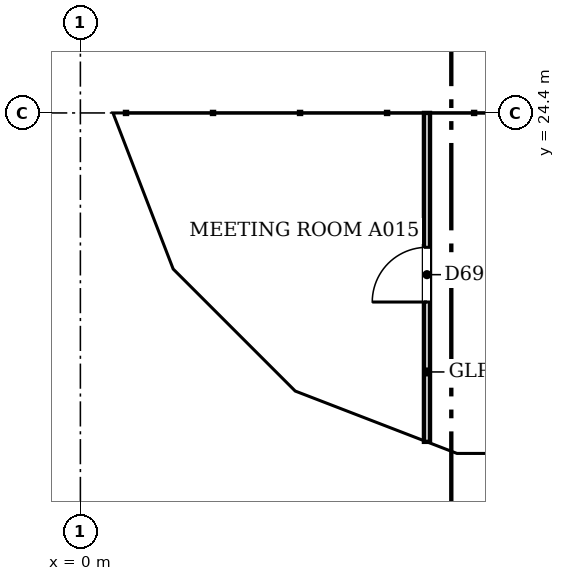
"""IFC4 building model, lengths in metres.
Left out: names, types, materials, properties, quantities, classifications, styles, units other than length and angle.
Written with IfcOpenShell. Run it as: python <this file> out.ifc"""

import sys

from ifc_helpers import new_model, si_unit, direction, frame, frame_2d, origin, place, context, subcontext, project, spatial, polyline, rectangle, outline, extrude, faceted_brep, source, transform, mapped, element, fill, save


model = new_model("IFC4")
c1 = context("Model", 3, precision=1e-05, world=origin(), true_north=direction((0.0, 1.0)))
c2 = subcontext(c1, "Body", "Model", "MODEL_VIEW")
j1 = project(units=[si_unit("LENGTHUNIT", "METRE"), si_unit("PLANEANGLEUNIT", "RADIAN")], contexts=[c1])
p1 = place(None, origin())
s1 = spatial("IfcSite", under=j1, at=p1, CompositionType="ELEMENT")
p2 = place(p1, origin())
s2 = spatial("IfcBuilding", under=s1, at=p2, CompositionType="ELEMENT")
p3 = place(p2, frame((0.0, 0.0, 209.3)))
s3 = spatial("IfcBuildingStorey", under=s2, at=p3, CompositionType="ELEMENT", Elevation=209.3)
m1 = source(origin(), c2, "Body", "Brep", [
    faceted_brep([(3.003, -0.25, 0.0), (3.05, -0.25, 0.06), (3.05, -0.25, 7.54), (3.003, -0.25, 7.6), (0.0, -0.25, 3.8), (0.0, 0.25, 3.8), (2.957, 0.25, 7.541), (2.957, 0.25, 0.059), (3.003, 0.0, 0.0), (3.003, 0.0, 7.6)], [[[0, 1, 2, 3, 4]], [[5, 6, 7]], [[1, 0, 8]], [[9, 3, 2]], [[6, 5, 4, 3, 9]], [[5, 7, 8, 0, 4]], [[1, 8, 7, 6, 9, 2]]]),
])
p4 = place(p3, frame((0.25, 27.45, -3.8), z_axis=(0.0, 0.0, 1.0), x_axis=(0.0, -1.0, 0.0)))
e1 = element("IfcWall", 1, at=p4, inside=s3, PredefinedType="SOLIDWALL", context=c2, shape_type="MappedRepresentation", body=[
    mapped(m1, transform((0.0, 0.0, 0.0), scale=1.0)),
])
m2 = source(origin(), c2, "Body", "SweptSolid", [
    extrude(outline(polyline([(2.803, 6.944), (0.319, 3.8), (2.803, 0.656), (2.803, 6.944)])), frame((0.0, 0.26, 0.0), z_axis=(0.0, -1.0, 0.0), x_axis=(1.0, 0.0, 0.0)), (0.0, 0.0, 1.0), 0.52),
])
p5 = place(p4, origin())
e2 = element("IfcOpeningElement", 2, at=p5, cuts=e1, PredefinedType="OPENING", context=c2, shape_type="MappedRepresentation", body=[
    mapped(m2, transform((0.0, 0.0, 0.0), scale=1.0)),
])
m3 = source(origin(), c2, "Body", "Brep", [
    faceted_brep([(0.047, -0.25, 0.0), (2.997, -0.25, 3.8), (0.047, -0.25, 7.6), (0.0, -0.25, 7.541), (0.0, -0.25, 0.059), (0.093, 0.25, 7.54), (2.944, 0.25, 3.868), (2.944, 0.25, 3.732), (0.093, 0.25, 0.06), (2.997, 0.0, 3.8), (0.047, 0.0, 0.0), (0.047, 0.0, 7.6)], [[[0, 1, 2, 3, 4]], [[5, 6, 7, 8]], [[8, 7, 9, 1, 0, 10]], [[6, 5, 11, 2, 1, 9]], [[3, 2, 11]], [[10, 0, 4]], [[8, 10, 4, 3, 11, 5]], [[9, 7, 6]]]),
])
p6 = place(p3, frame((0.233, 24.49, -3.8), z_axis=(0.0, 0.0, 1.0), x_axis=(0.359901446078, -0.932990326376, 0.0)))
e3 = element("IfcWall", 3, at=p6, inside=s3, PredefinedType="SOLIDWALL", context=c2, shape_type="MappedRepresentation", body=[
    mapped(m3, transform((0.0, 0.0, 0.0), scale=1.0)),
])
m4 = source(origin(), c2, "Body", "SweptSolid", [
    extrude(outline(polyline([(0.247, 0.665), (2.681, 3.8), (0.247, 6.935), (0.247, 0.665)])), frame((0.0, 0.26, 0.0), z_axis=(0.0, -1.0, 0.0), x_axis=(1.0, 0.0, 0.0)), (0.0, 0.0, 1.0), 0.52),
])
p7 = place(p6, origin())
e4 = element("IfcOpeningElement", 4, at=p7, cuts=e3, PredefinedType="OPENING", context=c2, shape_type="MappedRepresentation", body=[
    mapped(m4, transform((0.0, 0.0, 0.0), scale=1.0)),
])
m5 = source(origin(), c2, "Body", "Brep", [
    faceted_brep([(2.944, -0.25, 0.0), (2.997, -0.25, 0.068), (2.997, -0.25, 7.532), (2.944, -0.25, 7.6), (0.0, -0.25, 3.8), (0.053, 0.25, 3.868), (2.891, 0.25, 7.532), (2.891, 0.25, 0.068), (0.053, 0.25, 3.732), (2.944, 0.0, 0.0), (2.944, 0.0, 7.6), (0.0, 0.0, 3.8)], [[[0, 1, 2, 3, 4]], [[5, 6, 7, 8]], [[1, 0, 9]], [[10, 3, 2]], [[6, 5, 11, 4, 3, 10]], [[8, 7, 9, 0, 4, 11]], [[8, 11, 5]], [[1, 9, 7, 6, 10, 2]]]),
])
p8 = place(p3, frame((1.312, 21.694, -3.8), z_axis=(0.0, 0.0, 1.0), x_axis=(0.707066050402, -0.707147509625, 0.0)))
e5 = element("IfcWall", 5, at=p8, inside=s3, PredefinedType="SOLIDWALL", context=c2, shape_type="MappedRepresentation", body=[
    mapped(m5, transform((0.0, 0.0, 0.0), scale=1.0)),
])
m6 = source(origin(), c2, "Body", "SweptSolid", [
    extrude(outline(polyline([(2.744, 6.934), (0.316, 3.8), (2.744, 0.666), (2.744, 6.934)])), frame((0.0, 0.26, 0.0), z_axis=(0.0, -1.0, 0.0), x_axis=(1.0, 0.0, 0.0)), (0.0, 0.0, 1.0), 0.52),
])
p9 = place(p8, origin())
e6 = element("IfcOpeningElement", 6, at=p9, cuts=e5, PredefinedType="OPENING", context=c2, shape_type="MappedRepresentation", body=[
    mapped(m6, transform((0.0, 0.0, 0.0), scale=1.0)),
])
m7 = source(origin(), c2, "Body", "Brep", [
    faceted_brep([(0.053, -0.25, 0.0), (3.003, -0.25, 3.8), (0.053, -0.25, 7.6), (0.0, -0.25, 7.532), (0.0, -0.25, 0.068), (0.106, 0.25, 7.532), (2.957, 0.25, 3.86), (2.957, 0.25, 3.74), (0.106, 0.25, 0.068), (3.003, 0.0, 3.8), (0.053, 0.0, 0.0), (0.053, 0.0, 7.6)], [[[0, 1, 2, 3, 4]], [[5, 6, 7, 8]], [[8, 7, 9, 1, 0, 10]], [[6, 5, 11, 2, 1, 9]], [[3, 2, 11]], [[10, 0, 4]], [[8, 10, 4, 3, 11, 5]], [[9, 7, 6]]]),
])
p10 = place(p3, frame((3.344, 19.631, -3.8), z_axis=(0.0, 0.0, 1.0), x_axis=(0.933007896601, -0.359855894603, 0.0)))
e7 = element("IfcWall", 7, at=p10, inside=s3, PredefinedType="SOLIDWALL", context=c2, shape_type="MappedRepresentation", body=[
    mapped(m7, transform((0.0, 0.0, 0.0), scale=1.0)),
])
m8 = source(origin(), c2, "Body", "SweptSolid", [
    extrude(outline(polyline([(0.253, 0.665), (2.687, 3.8), (0.253, 6.935), (0.253, 0.665)])), frame((0.0, 0.26, 0.0), z_axis=(0.0, -1.0, 0.0), x_axis=(1.0, 0.0, 0.0)), (0.0, 0.0, 1.0), 0.52),
])
p11 = place(p10, origin())
e8 = element("IfcOpeningElement", 8, at=p11, cuts=e7, PredefinedType="OPENING", context=c2, shape_type="MappedRepresentation", body=[
    mapped(m8, transform((0.0, 0.0, 0.0), scale=1.0)),
])
m9 = source(origin(), c2, "Body", "Brep", [
    faceted_brep([(3.003, -0.25, 0.0), (6.053, -0.25, 3.8), (3.003, -0.25, 7.6), (0.0, -0.25, 3.8), (0.047, 0.25, 3.859), (3.003, 0.25, 7.6), (6.053, 0.25, 3.8), (3.003, 0.25, 0.0), (0.047, 0.25, 3.741), (0.0, 0.0, 3.8)], [[[0, 1, 2, 3]], [[4, 5, 6, 7, 8]], [[7, 6, 1, 0]], [[6, 5, 2, 1]], [[5, 4, 9, 3, 2]], [[8, 7, 0, 3, 9]], [[8, 9, 4]]]),
])
p12 = place(p3, frame((6.146, 18.55, -3.8), z_axis=(0.0, 0.0, 1.0), x_axis=(1.0, 0.0, 0.0)))
e9 = element("IfcWall", 9, at=p12, inside=s3, PredefinedType="SOLIDWALL", context=c2, shape_type="MappedRepresentation", body=[
    mapped(m9, transform((0.0, 0.0, 0.0), scale=1.0)),
])
m10 = source(origin(), c2, "Body", "SweptSolid", [
    extrude(outline(polyline([(3.005, 0.401), (5.733, 3.8), (3.005, 7.199), (0.319, 3.8), (3.005, 0.401)])), frame((0.0, 0.26, 0.0), z_axis=(0.0, -1.0, 0.0), x_axis=(1.0, 0.0, 0.0)), (0.0, 0.0, 1.0), 0.52),
])
p13 = place(p12, origin())
e10 = element("IfcOpeningElement", 10, at=p13, cuts=e9, PredefinedType="OPENING", context=c2, shape_type="MappedRepresentation", body=[
    mapped(m10, transform((0.0, 0.0, 0.0), scale=1.0)),
])
p14 = place(p2, frame((0.0, 0.0, 213.1)))
s4 = spatial("IfcBuildingStorey", under=s2, at=p14, CompositionType="ELEMENT", Elevation=213.1)
m11 = source(origin(), c2, "Body", "Brep", [
    faceted_brep([(3.05, -0.25, 0.0), (6.053, -0.25, 3.8), (3.05, -0.25, 7.6), (0.0, -0.25, 3.8), (0.0, 0.25, 3.8), (3.05, 0.25, 7.6), (6.007, 0.25, 3.859), (6.007, 0.25, 3.741), (3.05, 0.25, 0.0), (6.053, 0.0, 3.8)], [[[0, 1, 2, 3]], [[4, 5, 6, 7, 8]], [[8, 7, 9, 1, 0]], [[6, 5, 2, 1, 9]], [[5, 4, 3, 2]], [[4, 8, 0, 3]], [[7, 6, 9]]]),
])
p15 = place(p14, frame((0.25, 30.5, -3.8), z_axis=(0.0, 0.0, 1.0), x_axis=(0.0, -1.0, 0.0)))
e11 = element("IfcWall", 11, at=p15, inside=s4, PredefinedType="SOLIDWALL", context=c2, shape_type="MappedRepresentation", body=[
    mapped(m11, transform((0.0, 0.0, 0.0), scale=1.0)),
])
m12 = source(origin(), c2, "Body", "SweptSolid", [
    extrude(outline(polyline([(3.049, 0.401), (5.735, 3.8), (3.049, 7.199), (0.321, 3.8), (3.049, 0.401)])), frame((0.0, 0.26, 0.0), z_axis=(0.0, -1.0, 0.0), x_axis=(1.0, 0.0, 0.0)), (0.0, 0.0, 1.0), 0.52),
])
p16 = place(p15, origin())
e12 = element("IfcOpeningElement", 12, at=p16, cuts=e11, PredefinedType="OPENING", context=c2, shape_type="MappedRepresentation", body=[
    mapped(m12, transform((0.0, 0.0, 0.0), scale=1.0)),
])
m13 = source(origin(), c2, "Body", "Brep", [
    faceted_brep([(2.95, -0.25, 0.0), (3.003, -0.25, 0.068), (3.003, -0.25, 7.531), (2.95, -0.25, 7.6), (0.0, -0.25, 3.8), (0.047, 0.25, 3.86), (2.898, 0.25, 7.532), (2.898, 0.25, 0.068), (0.047, 0.25, 3.74), (2.95, 0.0, 0.0), (2.95, 0.0, 7.6), (0.0, 0.0, 3.8)], [[[0, 1, 2, 3, 4]], [[5, 6, 7, 8]], [[1, 0, 9]], [[10, 3, 2]], [[6, 5, 11, 4, 3, 10]], [[8, 7, 9, 0, 4, 11]], [[8, 11, 5]], [[1, 9, 7, 6, 10, 2]]]),
])
p17 = place(p14, frame((0.25, 24.447, -3.8), z_axis=(0.0, 0.0, 1.0), x_axis=(0.35992665181, -0.932980602862, 0.0)))
e13 = element("IfcWall", 13, at=p17, inside=s4, PredefinedType="SOLIDWALL", context=c2, shape_type="MappedRepresentation", body=[
    mapped(m13, transform((0.0, 0.0, 0.0), scale=1.0)),
])
m14 = source(origin(), c2, "Body", "SweptSolid", [
    extrude(outline(polyline([(2.75, 6.935), (0.316, 3.8), (2.75, 0.665), (2.75, 6.935)])), frame((0.0, 0.26, 0.0), z_axis=(0.0, -1.0, 0.0), x_axis=(1.0, 0.0, 0.0)), (0.0, 0.0, 1.0), 0.52),
])
p18 = place(p17, origin())
e14 = element("IfcOpeningElement", 14, at=p18, cuts=e13, PredefinedType="OPENING", context=c2, shape_type="MappedRepresentation", body=[
    mapped(m14, transform((0.0, 0.0, 0.0), scale=1.0)),
])
m15 = source(origin(), c2, "Body", "Brep", [
    faceted_brep([(0.053, -0.25, 0.0), (2.997, -0.25, 3.8), (0.053, -0.25, 7.6), (0.0, -0.25, 7.532), (0.0, -0.25, 0.068), (0.106, 0.25, 7.531), (2.944, 0.25, 3.868), (2.944, 0.25, 3.732), (0.106, 0.25, 0.068), (2.997, 0.0, 3.8), (0.053, 0.0, 0.0), (0.053, 0.0, 7.6)], [[[0, 1, 2, 3, 4]], [[5, 6, 7, 8]], [[8, 7, 9, 1, 0, 10]], [[6, 5, 11, 2, 1, 9]], [[3, 2, 11]], [[10, 0, 4]], [[8, 10, 4, 3, 11, 5]], [[7, 6, 9]]]),
])
p19 = place(p14, frame((1.274, 21.731, -3.8), z_axis=(0.0, 0.0, 1.0), x_axis=(0.707147509625, -0.707066050402, 0.0)))
e15 = element("IfcWall", 15, at=p19, inside=s4, PredefinedType="SOLIDWALL", context=c2, shape_type="MappedRepresentation", body=[
    mapped(m15, transform((0.0, 0.0, 0.0), scale=1.0)),
])
m16 = source(origin(), c2, "Body", "SweptSolid", [
    extrude(outline(polyline([(0.253, 0.666), (2.681, 3.8), (0.253, 6.934), (0.253, 0.666)])), frame((0.0, 0.26, 0.0), z_axis=(0.0, -1.0, 0.0), x_axis=(1.0, 0.0, 0.0)), (0.0, 0.0, 1.0), 0.52),
])
p20 = place(p19, origin())
e16 = element("IfcOpeningElement", 16, at=p20, cuts=e15, PredefinedType="OPENING", context=c2, shape_type="MappedRepresentation", body=[
    mapped(m16, transform((0.0, 0.0, 0.0), scale=1.0)),
])
m17 = source(origin(), c2, "Body", "Brep", [
    faceted_brep([(2.95, -0.25, 0.0), (2.997, -0.25, 0.059), (2.997, -0.25, 7.541), (2.95, -0.25, 7.6), (0.0, -0.25, 3.8), (0.053, 0.25, 3.868), (2.904, 0.25, 7.54), (2.904, 0.25, 0.06), (0.053, 0.25, 3.732), (2.95, 0.0, 0.0), (2.95, 0.0, 7.6), (0.0, 0.0, 3.8)], [[[0, 1, 2, 3, 4]], [[5, 6, 7, 8]], [[1, 0, 9]], [[10, 3, 2]], [[6, 5, 11, 4, 3, 10]], [[8, 7, 9, 0, 4, 11]], [[8, 11, 5]], [[1, 9, 7, 6, 10, 2]]]),
])
p21 = place(p14, frame((3.394, 19.612, -3.8), z_axis=(0.0, 0.0, 1.0), x_axis=(0.932990326376, -0.359901446078, 0.0)))
e17 = element("IfcWall", 17, at=p21, inside=s4, PredefinedType="SOLIDWALL", context=c2, shape_type="MappedRepresentation", body=[
    mapped(m17, transform((0.0, 0.0, 0.0), scale=1.0)),
])
p22 = place(p21, origin())
e18 = element("IfcOpeningElement", 18, at=p22, cuts=e17, PredefinedType="OPENING", context=c2, shape_type="MappedRepresentation", body=[
    mapped(m14, transform((0.0, 0.0, 0.0), scale=1.0)),
])
m18 = source(origin(), c2, "Body", "Brep", [
    faceted_brep([(0.047, -0.25, 0.0), (3.05, -0.25, 3.8), (0.047, -0.25, 7.6), (0.0, -0.25, 7.54), (0.0, -0.25, 0.06), (0.093, 0.25, 7.541), (3.05, 0.25, 3.8), (0.093, 0.25, 0.059), (0.047, 0.0, 0.0), (0.047, 0.0, 7.6)], [[[0, 1, 2, 3, 4]], [[5, 6, 7]], [[7, 6, 1, 0, 8]], [[6, 5, 9, 2, 1]], [[3, 2, 9]], [[8, 0, 4]], [[7, 8, 4, 3, 9, 5]]]),
])
p23 = place(p14, frame((6.1, 18.55, -3.8), z_axis=(0.0, 0.0, 1.0), x_axis=(1.0, 0.0, 0.0)))
e19 = element("IfcWall", 19, at=p23, inside=s4, PredefinedType="SOLIDWALL", context=c2, shape_type="MappedRepresentation", body=[
    mapped(m18, transform((0.0, 0.0, 0.0), scale=1.0)),
])
m19 = source(origin(), c2, "Body", "SweptSolid", [
    extrude(outline(polyline([(0.247, 0.656), (2.731, 3.8), (0.247, 6.944), (0.247, 0.656)])), frame((0.0, 0.26, 0.0), z_axis=(0.0, -1.0, 0.0), x_axis=(1.0, 0.0, 0.0)), (0.0, 0.0, 1.0), 0.52),
])
p24 = place(p23, origin())
e20 = element("IfcOpeningElement", 20, at=p24, cuts=e19, PredefinedType="OPENING", context=c2, shape_type="MappedRepresentation", body=[
    mapped(m19, transform((0.0, 0.0, 0.0), scale=1.0)),
])
p25 = place(p3, frame((5.7, 18.99, 0.0), z_axis=(0.0, 0.0, 1.0), x_axis=(0.0, 1.0, 0.0)))
e21 = element("IfcWall", 21, at=p25, inside=s3, PredefinedType="PARTITIONING", context=c2, shape_type="SweptSolid", body=[
    extrude(rectangle(XDim=5.41, YDim=0.1, at=frame_2d((2.705, 0.0))), origin(), (0.0, 0.0, 1.0), 3.067),
])
m20 = source(origin(), c2, "Body", "SweptSolid", [
    extrude(rectangle(XDim=0.9, YDim=2.1, at=frame_2d((0.45, 1.05))), frame((0.0, 0.06, 0.0), z_axis=(0.0, -1.0, 0.0), x_axis=(1.0, 0.0, 0.0)), (0.0, 0.0, 1.0), 0.12),
])
p26 = place(p25, frame((2.3, 0.0, 0.0)))
e22 = element("IfcOpeningElement", 22, at=p26, cuts=e21, PredefinedType="OPENING", context=c2, shape_type="MappedRepresentation", body=[
    mapped(m20, transform((0.0, 0.0, 0.0), scale=1.0)),
])
m21 = source(origin(), c2, "Body", "SweptSolid", [
    extrude(rectangle(XDim=0.9, YDim=2.1, at=frame_2d((0.45, 1.05))), frame((0.0, 0.025, 0.0), z_axis=(0.0, -1.0, 0.0), x_axis=(1.0, 0.0, 0.0)), (0.0, 0.0, 1.0), 0.05),
])
p27 = place(p26, origin())
e23 = element("IfcDoor", 23, at=p27, inside=s3, OperationType="SINGLE_SWING_LEFT", PredefinedType="DOOR", context=c2, shape_type="MappedRepresentation", body=[
    mapped(m21, transform((0.0, 0.0, 0.0), scale=1.0)),
])
fill(e22, e23)
save(model, sys.argv[1])
